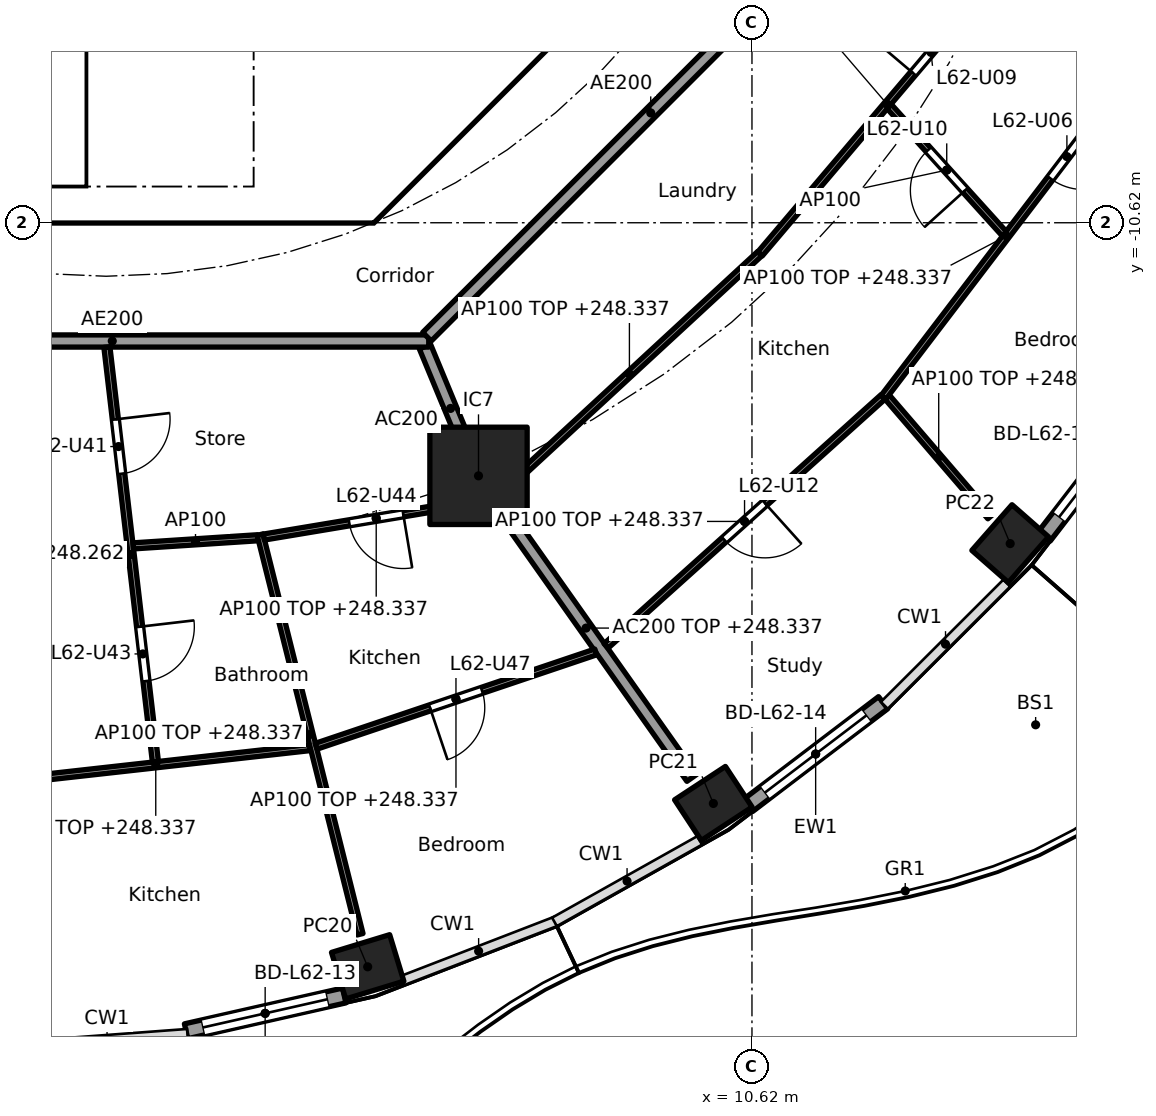
"""IFC4 building model, lengths in metres.
Left out: names, types, materials, properties, quantities, classifications, styles, units other than length and angle.
Written with IfcOpenShell. Run it as: python <this file> out.ifc"""

import sys

from ifc_helpers import new_model, si_unit, direction, frame, frame_2d, origin, origin_2d, place, context, subcontext, project, spatial, polyline, rectangle, hollow_rectangle, outline, extrude, element, fill, save


model = new_model("IFC4")
c1 = context("Model", 3, precision=1e-05, world=origin(), true_north=direction((0.0, 1.0)))
c2 = subcontext(c1, "Body", "Model", "MODEL_VIEW")
j1 = project(units=[si_unit("LENGTHUNIT", "METRE"), si_unit("PLANEANGLEUNIT", "RADIAN")], contexts=[c1])
p1 = place(None, origin())
s1 = spatial("IfcSite", under=j1, at=p1, CompositionType="ELEMENT")
p2 = place(p1, origin())
s2 = spatial("IfcBuilding", under=s1, at=p2, CompositionType="ELEMENT")
p3 = place(p2, frame((0.0, 0.0, 245.5)))
s3 = spatial("IfcBuildingStorey", under=s2, at=p3, CompositionType="ELEMENT", Elevation=245.5)
for number, where, z_axis, x_axis in (
    (1, (4.3, -22.856, 0.0), (0.0, 0.0, 1.0), (0.957, 0.292, 0.0)),
    (2, (9.985, -20.17, 0.0), (0.0, 0.0, 1.0), (0.836, 0.549, 0.0)),
    (3, (14.866, -15.896, 0.0), (0.0, 0.0, 1.0), (0.66, 0.751, 0.0)),
):
    element("IfcColumn", number, at=place(p3, frame(where, z_axis=z_axis, x_axis=x_axis)), inside=s3, PredefinedType="COLUMN", context=c2, shape_type="SweptSolid", body=[
        extrude(hollow_rectangle(XDim=1.0, YDim=0.8, WallThickness=0.032, at=origin_2d()), origin(), (0.0, 0.0, 1.0), 3.7),
    ])
p4 = place(p3, frame((6.123, -14.782, 0.0), z_axis=(0.0, 0.0, 1.0), x_axis=(1.0, 0.0, 0.0)))
e4 = element("IfcColumn", 4, at=p4, inside=s3, PredefinedType="COLUMN", context=c2, shape_type="SweptSolid", body=[
    extrude(rectangle(XDim=1.6, YDim=1.6, at=origin_2d()), origin(), (0.0, 0.0, 1.0), 3.7),
])
p5 = place(p3, frame((3.915, -23.327, 0.0), z_axis=(0.0, 0.0, 1.0), x_axis=(-0.975324089124, -0.220777990694, 0.0)))
e5 = element("IfcWall", 5, at=p5, inside=s3, PredefinedType="SOLIDWALL", context=c2, shape_type="SweptSolid", body=[
    extrude(rectangle(XDim=2.666, YDim=0.25, at=frame_2d((1.333, 0.0))), origin(), (0.0, 0.0, 1.0), 3.44),
])
p6 = place(p5, frame((0.283, 0.0, 0.0)))
e6 = element("IfcOpeningElement", 6, at=p6, cuts=e5, PredefinedType="OPENING", context=c2, shape_type="SweptSolid", body=[
    extrude(rectangle(XDim=2.1, YDim=2.4, at=frame_2d((1.05, 1.2))), frame((0.0, 0.135, 0.0), z_axis=(0.0, -1.0, 0.0), x_axis=(1.0, 0.0, 0.0)), (0.0, 0.0, 1.0), 0.27),
])
p7 = place(p3, frame((12.777, -18.513, 0.0), z_axis=(0.0, 0.0, 1.0), x_axis=(-0.796022158395, -0.605267480825, 0.0)))
e7 = element("IfcWall", 7, at=p7, inside=s3, PredefinedType="SOLIDWALL", context=c2, shape_type="SweptSolid", body=[
    extrude(rectangle(XDim=2.789, YDim=0.25, at=frame_2d((1.395, 0.0))), origin(), (0.0, 0.0, 1.0), 3.44),
])
p8 = place(p7, frame((0.344, 0.0, 0.0)))
e8 = element("IfcOpeningElement", 8, at=p8, cuts=e7, PredefinedType="OPENING", context=c2, shape_type="SweptSolid", body=[
    extrude(rectangle(XDim=2.1, YDim=2.4, at=frame_2d((1.05, 1.2))), frame((0.0, 0.135, 0.0), z_axis=(0.0, -1.0, 0.0), x_axis=(1.0, 0.0, 0.0)), (0.0, 0.0, 1.0), 0.27),
])
p9 = place(p3, frame((17.197, -13.48, 0.0), z_axis=(0.0, 0.0, 1.0), x_axis=(-0.610438565676, -0.792063607001, 0.0)))
e9 = element("IfcWall", 9, at=p9, inside=s3, PredefinedType="SOLIDWALL", context=c2, shape_type="SweptSolid", body=[
    extrude(rectangle(XDim=2.901, YDim=0.25, at=frame_2d((1.45, 0.0))), origin(), (0.0, 0.0, 1.0), 3.44),
])
p10 = place(p9, frame((0.4, 0.0, 0.0)))
e10 = element("IfcOpeningElement", 10, at=p10, cuts=e9, PredefinedType="OPENING", context=c2, shape_type="SweptSolid", body=[
    extrude(rectangle(XDim=2.1, YDim=2.4, at=frame_2d((1.05, 1.2))), frame((0.0, 0.135, 0.0), z_axis=(0.0, -1.0, 0.0), x_axis=(1.0, 0.0, 0.0)), (0.0, 0.0, 1.0), 0.27),
])
p11 = place(p3, frame((4.613, -9.988, 0.0), z_axis=(0.0, 0.0, 1.0), x_axis=(0.707106781187, 0.707106781187, 0.0)))
e11 = element("IfcWall", 11, at=p11, inside=s3, PredefinedType="SHEAR", context=c2, shape_type="SweptSolid", body=[
    extrude(rectangle(XDim=7.602, YDim=0.6, at=frame_2d((3.801, 0.0))), origin(), (0.0, 0.0, 1.0), 3.44),
])
p12 = place(p11, frame((3.201, 0.0, 0.0)))
e12 = element("IfcOpeningElement", 12, at=p12, cuts=e11, PredefinedType="OPENING", context=c2, shape_type="SweptSolid", body=[
    extrude(rectangle(XDim=1.2, YDim=2.1, at=frame_2d((0.6, 1.05))), frame((0.0, 0.31, 0.0), z_axis=(0.0, -1.0, 0.0), x_axis=(1.0, 0.0, 0.0)), (0.0, 0.0, 1.0), 0.62),
])
p13 = place(p3, frame((4.0, -10.025, 0.0), z_axis=(0.0, 0.0, 1.0), x_axis=(0.0, 1.0, 0.0)))
e13 = element("IfcWall", 13, at=p13, inside=s3, PredefinedType="SOLIDWALL", context=c2, shape_type="SweptSolid", body=[
    extrude(rectangle(XDim=3.0, YDim=0.2, at=frame_2d((1.5, 0.0))), origin(), (0.0, 0.0, 1.0), 3.44),
])
p14 = place(p13, frame((0.975, 0.0, 0.0)))
e14 = element("IfcOpeningElement", 14, at=p14, cuts=e13, PredefinedType="OPENING", context=c2, shape_type="SweptSolid", body=[
    extrude(rectangle(XDim=1.1, YDim=2.1, at=frame_2d((0.55, 1.05))), frame((0.0, 0.11, 0.0), z_axis=(0.0, -1.0, 0.0), x_axis=(1.0, 0.0, 0.0)), (0.0, 0.0, 1.0), 0.22),
])
p15 = place(p3, origin())
e15 = element("IfcWall", 15, at=p15, inside=s3, PredefinedType="SHEAR", context=c2, shape_type="SweptSolid", body=[
    extrude(outline(polyline([(-4.152, -10.025), (4.152, -10.025), (4.401, -9.776), (4.825, -10.2), (4.401, -10.625), (-4.401, -10.625), (-4.825, -10.2), (-4.401, -9.776), (-4.152, -10.025)])), origin(), (0.0, 0.0, 1.0), 3.44),
])
p16 = place(p3, frame((5.243, -12.657, 0.0), z_axis=(0.0, 0.0, 1.0), x_axis=(0.382691608661, -0.923876145736, 0.0)))
e16 = element("IfcWall", 16, at=p16, inside=s3, PredefinedType="PARTITIONING", context=c2, shape_type="SweptSolid", body=[
    extrude(rectangle(XDim=2.2, YDim=0.2, at=frame_2d((1.1, 0.0))), origin(), (0.0, 0.0, 1.0), 3.44),
])
p17 = place(p3, frame((6.152, -14.823, 0.0), z_axis=(0.0, 0.0, 1.0), x_axis=(0.576994695158, -0.816747893637, 0.0)))
e17 = element("IfcWall", 17, at=p17, inside=s3, PredefinedType="PARTITIONING", context=c2, shape_type="SweptSolid", body=[
    extrude(rectangle(XDim=6.03, YDim=0.2, at=frame_2d((3.015, 0.0))), origin(), (0.0, 0.0, 1.0), 2.837),
])
p18 = place(p3, frame((-5.104, -12.565, 0.0), z_axis=(0.0, 0.0, 1.0), x_axis=(1.0, 0.0, 0.0)))
e18 = element("IfcWall", 18, at=p18, inside=s3, PredefinedType="PARTITIONING", context=c2, shape_type="SweptSolid", body=[
    extrude(rectangle(XDim=10.409, YDim=0.2, at=frame_2d((5.205, 0.0))), origin(), (0.0, 0.0, 1.0), 3.44),
])
p19 = place(p18, frame((2.87, 0.0, 0.0)))
e19 = element("IfcOpeningElement", 19, at=p19, cuts=e18, PredefinedType="OPENING", context=c2, shape_type="SweptSolid", body=[
    extrude(rectangle(XDim=1.0, YDim=2.1, at=frame_2d((0.5, 1.05))), frame((0.0, 0.11, 0.0), z_axis=(0.0, -1.0, 0.0), x_axis=(1.0, 0.0, 0.0)), (0.0, 0.0, 1.0), 0.22),
])
p20 = place(p3, frame((5.275, -12.494, 0.0), z_axis=(0.0, 0.0, 1.0), x_axis=(0.707106781187, 0.707106781187, 0.0)))
e20 = element("IfcWall", 20, at=p20, inside=s3, PredefinedType="PARTITIONING", context=c2, shape_type="SweptSolid", body=[
    extrude(rectangle(XDim=10.409, YDim=0.2, at=frame_2d((5.205, 0.0))), origin(), (0.0, 0.0, 1.0), 3.44),
])
p21 = place(p3, frame((-1.726, -19.818, 0.0), z_axis=(0.0, 0.0, 1.0), x_axis=(0.99381893047, 0.111013212902, 0.0)))
e21 = element("IfcWall", 21, at=p21, inside=s3, PredefinedType="PARTITIONING", context=c2, shape_type="SweptSolid", body=[
    extrude(rectangle(XDim=5.113, YDim=0.1, at=frame_2d((2.557, 0.0))), origin(), (0.0, 0.0, 1.0), 2.837),
])
p22 = place(p3, frame((0.012, -12.664, 0.0), z_axis=(0.0, 0.0, 1.0), x_axis=(0.116154290925, -0.993231181901, 0.0)))
e22 = element("IfcWall", 22, at=p22, inside=s3, PredefinedType="PARTITIONING", context=c2, shape_type="SweptSolid", body=[
    extrude(rectangle(XDim=6.867, YDim=0.1, at=frame_2d((3.433, 0.0))), origin(), (0.0, 0.0, 1.0), 2.762),
])
p23 = place(p22, frame((1.198, 0.0, 0.0)))
e23 = element("IfcOpeningElement", 23, at=p23, cuts=e22, PredefinedType="OPENING", context=c2, shape_type="SweptSolid", body=[
    extrude(rectangle(XDim=0.9, YDim=2.1, at=frame_2d((0.45, 1.05))), frame((0.0, 0.06, 0.0), z_axis=(0.0, -1.0, 0.0), x_axis=(1.0, 0.0, 0.0)), (0.0, 0.0, 1.0), 0.12),
])
p24 = place(p22, frame((4.631, 0.0, 0.0)))
e24 = element("IfcOpeningElement", 24, at=p24, cuts=e22, PredefinedType="OPENING", context=c2, shape_type="SweptSolid", body=[
    extrude(rectangle(XDim=0.9, YDim=2.1, at=frame_2d((0.45, 1.05))), frame((0.0, 0.06, 0.0), z_axis=(0.0, -1.0, 0.0), x_axis=(1.0, 0.0, 0.0)), (0.0, 0.0, 1.0), 0.12),
])
p25 = place(p3, frame((0.444, -15.934, 0.0), z_axis=(0.0, 0.0, 1.0), x_axis=(0.997882958479, 0.065035384045, 0.0)))
e25 = element("IfcWall", 25, at=p25, inside=s3, PredefinedType="PARTITIONING", context=c2, shape_type="SweptSolid", body=[
    extrude(rectangle(XDim=2.053, YDim=0.1, at=frame_2d((1.027, 0.0))), origin(), (0.0, 0.0, 1.0), 3.44),
])
p26 = place(p3, frame((2.531, -15.749, 0.0), z_axis=(0.0, 0.0, 1.0), x_axis=(0.242645858264, -0.970114935184, 0.0)))
e26 = element("IfcWall", 26, at=p26, inside=s3, PredefinedType="PARTITIONING", context=c2, shape_type="SweptSolid", body=[
    extrude(rectangle(XDim=6.774, YDim=0.1, at=frame_2d((3.387, 0.0))), origin(), (0.0, 0.0, 1.0), 2.837),
])
p27 = place(p3, frame((2.593, -15.789, 0.0), z_axis=(0.0, 0.0, 1.0), x_axis=(0.986385117656, 0.164451815639, 0.0)))
e27 = element("IfcWall", 27, at=p27, inside=s3, PredefinedType="PARTITIONING", context=c2, shape_type="SweptSolid", body=[
    extrude(rectangle(XDim=3.747, YDim=0.1, at=frame_2d((1.874, 0.0))), origin(), (0.0, 0.0, 1.0), 2.837),
])
p28 = place(p27, frame((1.424, 0.0, 0.0)))
e28 = element("IfcOpeningElement", 28, at=p28, cuts=e27, PredefinedType="OPENING", context=c2, shape_type="SweptSolid", body=[
    extrude(rectangle(XDim=0.9, YDim=2.1, at=frame_2d((0.45, 1.05))), frame((0.0, 0.06, 0.0), z_axis=(0.0, -1.0, 0.0), x_axis=(1.0, 0.0, 0.0)), (0.0, 0.0, 1.0), 0.12),
])
p29 = place(p3, frame((3.453, -19.229, 0.0), z_axis=(0.0, 0.0, 1.0), x_axis=(0.947565610716, 0.31956128268, 0.0)))
e29 = element("IfcWall", 29, at=p29, inside=s3, PredefinedType="PARTITIONING", context=c2, shape_type="SweptSolid", body=[
    extrude(rectangle(XDim=4.853, YDim=0.1, at=frame_2d((2.426, 0.0))), origin(), (0.0, 0.0, 1.0), 2.837),
])
p30 = place(p29, frame((1.976, 0.0, 0.0)))
e30 = element("IfcOpeningElement", 30, at=p30, cuts=e29, PredefinedType="OPENING", context=c2, shape_type="SweptSolid", body=[
    extrude(rectangle(XDim=0.9, YDim=2.1, at=frame_2d((0.45, 1.05))), frame((0.0, 0.06, 0.0), z_axis=(0.0, -1.0, 0.0), x_axis=(1.0, 0.0, 0.0)), (0.0, 0.0, 1.0), 0.12),
])
p31 = place(p3, frame((6.461, -15.088, 0.0), z_axis=(0.0, 0.0, 1.0), x_axis=(0.73461579427, 0.678483334217, 0.0)))
e31 = element("IfcWall", 31, at=p31, inside=s3, PredefinedType="PARTITIONING", context=c2, shape_type="SweptSolid", body=[
    extrude(rectangle(XDim=5.837, YDim=0.1, at=frame_2d((2.918, 0.0))), origin(), (0.0, 0.0, 1.0), 2.837),
])
p32 = place(p3, frame((8.22, -17.579, 0.0), z_axis=(0.0, 0.0, 1.0), x_axis=(0.743696370895, 0.668517544958, 0.0)))
e32 = element("IfcWall", 32, at=p32, inside=s3, PredefinedType="PARTITIONING", context=c2, shape_type="SweptSolid", body=[
    extrude(rectangle(XDim=6.125, YDim=0.1, at=frame_2d((3.062, 0.0))), origin(), (0.0, 0.0, 1.0), 2.837),
])
p33 = place(p32, frame((2.612, 0.0, 0.0)))
e33 = element("IfcOpeningElement", 33, at=p33, cuts=e32, PredefinedType="OPENING", context=c2, shape_type="SweptSolid", body=[
    extrude(rectangle(XDim=0.9, YDim=2.1, at=frame_2d((0.45, 1.05))), frame((0.0, 0.06, 0.0), z_axis=(0.0, -1.0, 0.0), x_axis=(1.0, 0.0, 0.0)), (0.0, 0.0, 1.0), 0.12),
])
p34 = place(p3, frame((10.753, -11.132, 0.0), z_axis=(0.0, 0.0, 1.0), x_axis=(0.64700741656, 0.762483706657, 0.0)))
e34 = element("IfcWall", 34, at=p34, inside=s3, PredefinedType="PARTITIONING", context=c2, shape_type="SweptSolid", body=[
    extrude(rectangle(XDim=6.459, YDim=0.1, at=frame_2d((3.229, 0.0))), origin(), (0.0, 0.0, 1.0), 2.837),
])
p35 = place(p34, frame((3.896, 0.0, 0.0)))
e35 = element("IfcOpeningElement", 35, at=p35, cuts=e34, PredefinedType="OPENING", context=c2, shape_type="SweptSolid", body=[
    extrude(rectangle(XDim=0.9, YDim=2.1, at=frame_2d((0.45, 1.05))), frame((0.0, 0.06, 0.0), z_axis=(0.0, -1.0, 0.0), x_axis=(1.0, 0.0, 0.0)), (0.0, 0.0, 1.0), 0.12),
])
p36 = place(p3, frame((12.845, -13.489, 0.0), z_axis=(0.0, 0.0, 1.0), x_axis=(0.652092276587, -0.758139606416, 0.0)))
e36 = element("IfcWall", 36, at=p36, inside=s3, PredefinedType="PARTITIONING", context=c2, shape_type="SweptSolid", body=[
    extrude(rectangle(XDim=2.594, YDim=0.1, at=frame_2d((1.297, 0.0))), origin(), (0.0, 0.0, 1.0), 2.837),
])
p37 = place(p3, frame((12.782, -13.491, 0.0), z_axis=(0.0, 0.0, 1.0), x_axis=(0.606125925512, 0.795368695903, 0.0)))
e37 = element("IfcWall", 37, at=p37, inside=s3, PredefinedType="PARTITIONING", context=c2, shape_type="SweptSolid", body=[
    extrude(rectangle(XDim=6.67, YDim=0.1, at=frame_2d((3.335, 0.0))), origin(), (0.0, 0.0, 1.0), 2.837),
])
p38 = place(p37, frame((4.527, 0.0, 0.0)))
e38 = element("IfcOpeningElement", 38, at=p38, cuts=e37, PredefinedType="OPENING", context=c2, shape_type="SweptSolid", body=[
    extrude(rectangle(XDim=0.9, YDim=2.1, at=frame_2d((0.45, 1.05))), frame((0.0, 0.06, 0.0), z_axis=(0.0, -1.0, 0.0), x_axis=(1.0, 0.0, 0.0)), (0.0, 0.0, 1.0), 0.12),
])
p39 = place(p3, frame((12.876, -8.707, 0.0), z_axis=(0.0, 0.0, 1.0), x_axis=(0.670768418052, -0.741666858733, 0.0)))
e39 = element("IfcWall", 39, at=p39, inside=s3, PredefinedType="PARTITIONING", context=c2, shape_type="SweptSolid", body=[
    extrude(rectangle(XDim=2.824, YDim=0.1, at=frame_2d((1.412, 0.0))), origin(), (0.0, 0.0, 1.0), 3.44),
])
p40 = place(p39, frame((0.962, 0.0, 0.0)))
e40 = element("IfcOpeningElement", 40, at=p40, cuts=e39, PredefinedType="OPENING", context=c2, shape_type="SweptSolid", body=[
    extrude(rectangle(XDim=0.9, YDim=2.1, at=frame_2d((0.45, 1.05))), frame((0.0, 0.06, 0.0), z_axis=(0.0, -1.0, 0.0), x_axis=(1.0, 0.0, 0.0)), (0.0, 0.0, 1.0), 0.12),
])
p41 = place(p6, origin())
e41 = element("IfcDoor", 41, at=p41, inside=s3, OperationType="SLIDING_TO_LEFT", PredefinedType="DOOR", context=c2, shape_type="SweptSolid", body=[
    extrude(rectangle(XDim=2.1, YDim=2.4, at=frame_2d((1.05, 1.2))), frame((0.0, 0.025, 0.0), z_axis=(0.0, -1.0, 0.0), x_axis=(1.0, 0.0, 0.0)), (0.0, 0.0, 1.0), 0.05),
])
fill(e6, e41)
p42 = place(p8, origin())
e42 = element("IfcDoor", 42, at=p42, inside=s3, OperationType="SLIDING_TO_LEFT", PredefinedType="DOOR", context=c2, shape_type="SweptSolid", body=[
    extrude(rectangle(XDim=2.1, YDim=2.4, at=frame_2d((1.05, 1.2))), frame((0.0, 0.025, 0.0), z_axis=(0.0, -1.0, 0.0), x_axis=(1.0, 0.0, 0.0)), (0.0, 0.0, 1.0), 0.05),
])
fill(e8, e42)
p43 = place(p10, origin())
e43 = element("IfcDoor", 43, at=p43, inside=s3, OperationType="SLIDING_TO_LEFT", PredefinedType="DOOR", context=c2, shape_type="SweptSolid", body=[
    extrude(rectangle(XDim=2.1, YDim=2.4, at=frame_2d((1.05, 1.2))), frame((0.0, 0.025, 0.0), z_axis=(0.0, -1.0, 0.0), x_axis=(1.0, 0.0, 0.0)), (0.0, 0.0, 1.0), 0.05),
])
fill(e10, e43)
p44 = place(p14, origin())
e44 = element("IfcDoor", 44, at=p44, inside=s3, OperationType="SINGLE_SWING_LEFT", PredefinedType="DOOR", context=c2, shape_type="SweptSolid", body=[
    extrude(rectangle(XDim=1.1, YDim=2.1, at=frame_2d((0.55, 1.05))), frame((0.0, 0.025, 0.0), z_axis=(0.0, -1.0, 0.0), x_axis=(1.0, 0.0, 0.0)), (0.0, 0.0, 1.0), 0.05),
])
fill(e14, e44)
p45 = place(p38, frame((0.9, 0.0, 0.0), x_axis=(-1.0, 0.0, 0.0)))
e45 = element("IfcDoor", 45, at=p45, inside=s3, OperationType="SINGLE_SWING_LEFT", PredefinedType="DOOR", context=c2, shape_type="SweptSolid", body=[
    extrude(rectangle(XDim=0.9, YDim=2.1, at=frame_2d((0.45, 1.05))), frame((0.0, 0.025, 0.0), z_axis=(0.0, -1.0, 0.0), x_axis=(1.0, 0.0, 0.0)), (0.0, 0.0, 1.0), 0.05),
])
fill(e38, e45)
p46 = place(p35, origin())
e46 = element("IfcDoor", 46, at=p46, inside=s3, OperationType="SINGLE_SWING_LEFT", PredefinedType="DOOR", context=c2, shape_type="SweptSolid", body=[
    extrude(rectangle(XDim=0.9, YDim=2.1, at=frame_2d((0.45, 1.05))), frame((0.0, 0.025, 0.0), z_axis=(0.0, -1.0, 0.0), x_axis=(1.0, 0.0, 0.0)), (0.0, 0.0, 1.0), 0.05),
])
fill(e35, e46)
p47 = place(p40, frame((0.9, 0.0, 0.0), x_axis=(-1.0, 0.0, 0.0)))
e47 = element("IfcDoor", 47, at=p47, inside=s3, OperationType="SINGLE_SWING_LEFT", PredefinedType="DOOR", context=c2, shape_type="SweptSolid", body=[
    extrude(rectangle(XDim=0.9, YDim=2.1, at=frame_2d((0.45, 1.05))), frame((0.0, 0.025, 0.0), z_axis=(0.0, -1.0, 0.0), x_axis=(1.0, 0.0, 0.0)), (0.0, 0.0, 1.0), 0.05),
])
fill(e40, e47)
p48 = place(p33, frame((0.9, 0.0, 0.0), x_axis=(-1.0, 0.0, 0.0)))
e48 = element("IfcDoor", 48, at=p48, inside=s3, OperationType="SINGLE_SWING_LEFT", PredefinedType="DOOR", context=c2, shape_type="SweptSolid", body=[
    extrude(rectangle(XDim=0.9, YDim=2.1, at=frame_2d((0.45, 1.05))), frame((0.0, 0.025, 0.0), z_axis=(0.0, -1.0, 0.0), x_axis=(1.0, 0.0, 0.0)), (0.0, 0.0, 1.0), 0.05),
])
fill(e33, e48)
p49 = place(p23, origin())
e49 = element("IfcDoor", 49, at=p49, inside=s3, OperationType="SINGLE_SWING_LEFT", PredefinedType="DOOR", context=c2, shape_type="SweptSolid", body=[
    extrude(rectangle(XDim=0.9, YDim=2.1, at=frame_2d((0.45, 1.05))), frame((0.0, 0.025, 0.0), z_axis=(0.0, -1.0, 0.0), x_axis=(1.0, 0.0, 0.0)), (0.0, 0.0, 1.0), 0.05),
])
fill(e23, e49)
p50 = place(p24, origin())
e50 = element("IfcDoor", 50, at=p50, inside=s3, OperationType="SINGLE_SWING_LEFT", PredefinedType="DOOR", context=c2, shape_type="SweptSolid", body=[
    extrude(rectangle(XDim=0.9, YDim=2.1, at=frame_2d((0.45, 1.05))), frame((0.0, 0.025, 0.0), z_axis=(0.0, -1.0, 0.0), x_axis=(1.0, 0.0, 0.0)), (0.0, 0.0, 1.0), 0.05),
])
fill(e24, e50)
p51 = place(p28, frame((0.9, 0.0, 0.0), x_axis=(-1.0, 0.0, 0.0)))
e51 = element("IfcDoor", 51, at=p51, inside=s3, OperationType="SINGLE_SWING_LEFT", PredefinedType="DOOR", context=c2, shape_type="SweptSolid", body=[
    extrude(rectangle(XDim=0.9, YDim=2.1, at=frame_2d((0.45, 1.05))), frame((0.0, 0.025, 0.0), z_axis=(0.0, -1.0, 0.0), x_axis=(1.0, 0.0, 0.0)), (0.0, 0.0, 1.0), 0.05),
])
fill(e28, e51)
p52 = place(p30, frame((0.9, 0.0, 0.0), x_axis=(-1.0, 0.0, 0.0)))
e52 = element("IfcDoor", 52, at=p52, inside=s3, OperationType="SINGLE_SWING_RIGHT", PredefinedType="DOOR", context=c2, shape_type="SweptSolid", body=[
    extrude(rectangle(XDim=0.9, YDim=2.1, at=frame_2d((0.45, 1.05))), frame((0.0, 0.025, 0.0), z_axis=(0.0, -1.0, 0.0), x_axis=(1.0, 0.0, 0.0)), (0.0, 0.0, 1.0), 0.05),
])
fill(e30, e52)
save(model, sys.argv[1])
